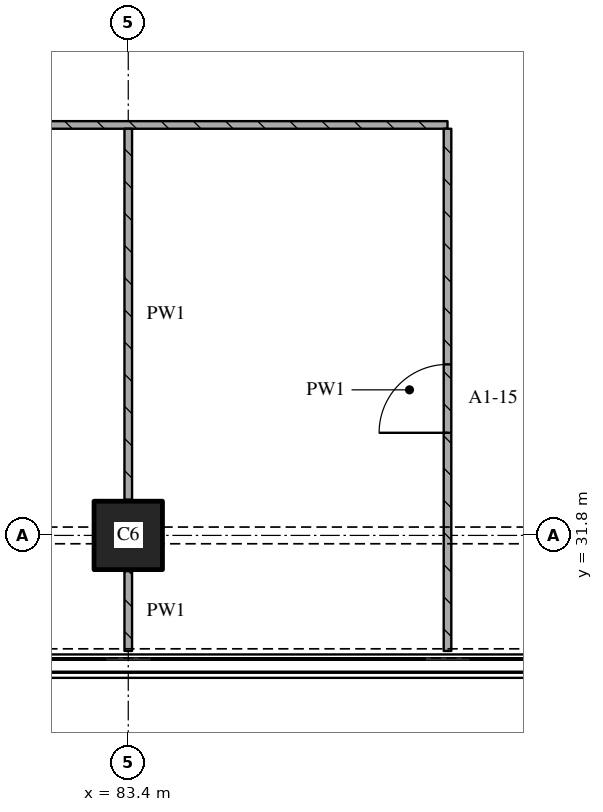
"""IFC4 building model, lengths in metres.
Left out: names, types, materials, properties, quantities, classifications, styles, units other than length and angle.
Written with IfcOpenShell. Run it as: python <this file> out.ifc"""

import sys

from ifc_helpers import new_model, si_unit, direction, frame, frame_2d, origin, origin_2d, place, context, subcontext, project, spatial, rectangle, extrude, element, fill, save


model = new_model("IFC4")
c1 = context("Model", 3, precision=1e-05, world=origin(), true_north=direction((0.0, 1.0)))
c2 = subcontext(c1, "Body", "Model", "MODEL_VIEW")
j1 = project(units=[si_unit("LENGTHUNIT", "METRE"), si_unit("PLANEANGLEUNIT", "RADIAN")], contexts=[c1])
p1 = place(None, origin())
s1 = spatial("IfcSite", under=j1, at=p1, CompositionType="ELEMENT")
p2 = place(p1, origin())
s2 = spatial("IfcBuilding", under=s1, at=p2, CompositionType="ELEMENT")
p3 = place(p2, frame((0.0, 0.0, 40.8)))
s3 = spatial("IfcBuildingStorey", under=s2, at=p3, CompositionType="ELEMENT", Elevation=40.8)
p4 = place(p3, frame((83.4, 31.8, 0.0), z_axis=(0.0, 0.0, 1.0), x_axis=(1.0, 0.0, 0.0)))
e1 = element("IfcColumn", 1, at=p4, inside=s3, PredefinedType="COLUMN", context=c2, shape_type="SweptSolid", body=[
    extrude(rectangle(XDim=0.9, YDim=0.9, at=origin_2d()), origin(), (0.0, 0.0, 1.0), 3.6),
])
p5 = place(p3, frame((87.6, 37.2, 0.0), z_axis=(0.0, 0.0, 1.0), x_axis=(-1.0, 0.0, 0.0)))
e2 = element("IfcWall", 2, at=p5, inside=s3, PredefinedType="PARTITIONING", context=c2, shape_type="SweptSolid", body=[
    extrude(rectangle(XDim=12.5, YDim=0.1, at=frame_2d((6.25, 0.0))), origin(), (0.0, 0.0, 1.0), 3.32),
])
p6 = place(p5, frame((5.85, 0.0, 0.0)))
e3 = element("IfcOpeningElement", 3, at=p6, cuts=e2, PredefinedType="OPENING", context=c2, shape_type="SweptSolid", body=[
    extrude(rectangle(XDim=0.9, YDim=2.1, at=frame_2d((0.45, 1.05))), frame((0.0, 0.06, 0.0), z_axis=(0.0, -1.0, 0.0), x_axis=(1.0, 0.0, 0.0)), (0.0, 0.0, 1.0), 0.12),
])
p7 = place(p5, frame((10.05, 0.0, 0.0)))
e4 = element("IfcOpeningElement", 4, at=p7, cuts=e2, PredefinedType="OPENING", context=c2, shape_type="SweptSolid", body=[
    extrude(rectangle(XDim=0.9, YDim=2.1, at=frame_2d((0.45, 1.05))), frame((0.0, 0.06, 0.0), z_axis=(0.0, -1.0, 0.0), x_axis=(1.0, 0.0, 0.0)), (0.0, 0.0, 1.0), 0.12),
])
p8 = place(p3, frame((83.4, 31.33, 0.0), z_axis=(0.0, 0.0, 1.0), x_axis=(0.0, -1.0, 0.0)))
e5 = element("IfcWall", 5, at=p8, inside=s3, PredefinedType="PARTITIONING", context=c2, shape_type="SweptSolid", body=[
    extrude(rectangle(XDim=1.05, YDim=0.1, at=frame_2d((0.525, 0.0))), origin(), (0.0, 0.0, 1.0), 3.32),
])
p9 = place(p3, frame((83.4, 37.15, 0.0), z_axis=(0.0, 0.0, 1.0), x_axis=(0.0, -1.0, 0.0)))
e6 = element("IfcWall", 6, at=p9, inside=s3, PredefinedType="PARTITIONING", context=c2, shape_type="SweptSolid", body=[
    extrude(rectangle(XDim=4.88, YDim=0.1, at=frame_2d((2.44, 0.0))), origin(), (0.0, 0.0, 1.0), 3.32),
])
p10 = place(p3, frame((87.6, 30.28, 0.0), z_axis=(0.0, 0.0, 1.0), x_axis=(0.0, 1.0, 0.0)))
e7 = element("IfcWall", 7, at=p10, inside=s3, PredefinedType="PARTITIONING", context=c2, shape_type="SweptSolid", body=[
    extrude(rectangle(XDim=6.87, YDim=0.1, at=frame_2d((3.435, 0.0))), origin(), (0.0, 0.0, 1.0), 3.32),
])
p11 = place(p10, frame((2.87, 0.0, 0.0)))
e8 = element("IfcOpeningElement", 8, at=p11, cuts=e7, PredefinedType="OPENING", context=c2, shape_type="SweptSolid", body=[
    extrude(rectangle(XDim=0.9, YDim=2.1, at=frame_2d((0.45, 1.05))), frame((0.0, 0.06, 0.0), z_axis=(0.0, -1.0, 0.0), x_axis=(1.0, 0.0, 0.0)), (0.0, 0.0, 1.0), 0.12),
])
p12 = place(p11, origin())
e9 = element("IfcDoor", 9, at=p12, inside=s3, OperationType="SINGLE_SWING_LEFT", PredefinedType="DOOR", context=c2, shape_type="SweptSolid", body=[
    extrude(rectangle(XDim=0.9, YDim=2.1, at=frame_2d((0.45, 1.05))), frame((0.0, 0.025, 0.0), z_axis=(0.0, -1.0, 0.0), x_axis=(1.0, 0.0, 0.0)), (0.0, 0.0, 1.0), 0.05),
])
fill(e8, e9)
save(model, sys.argv[1])
